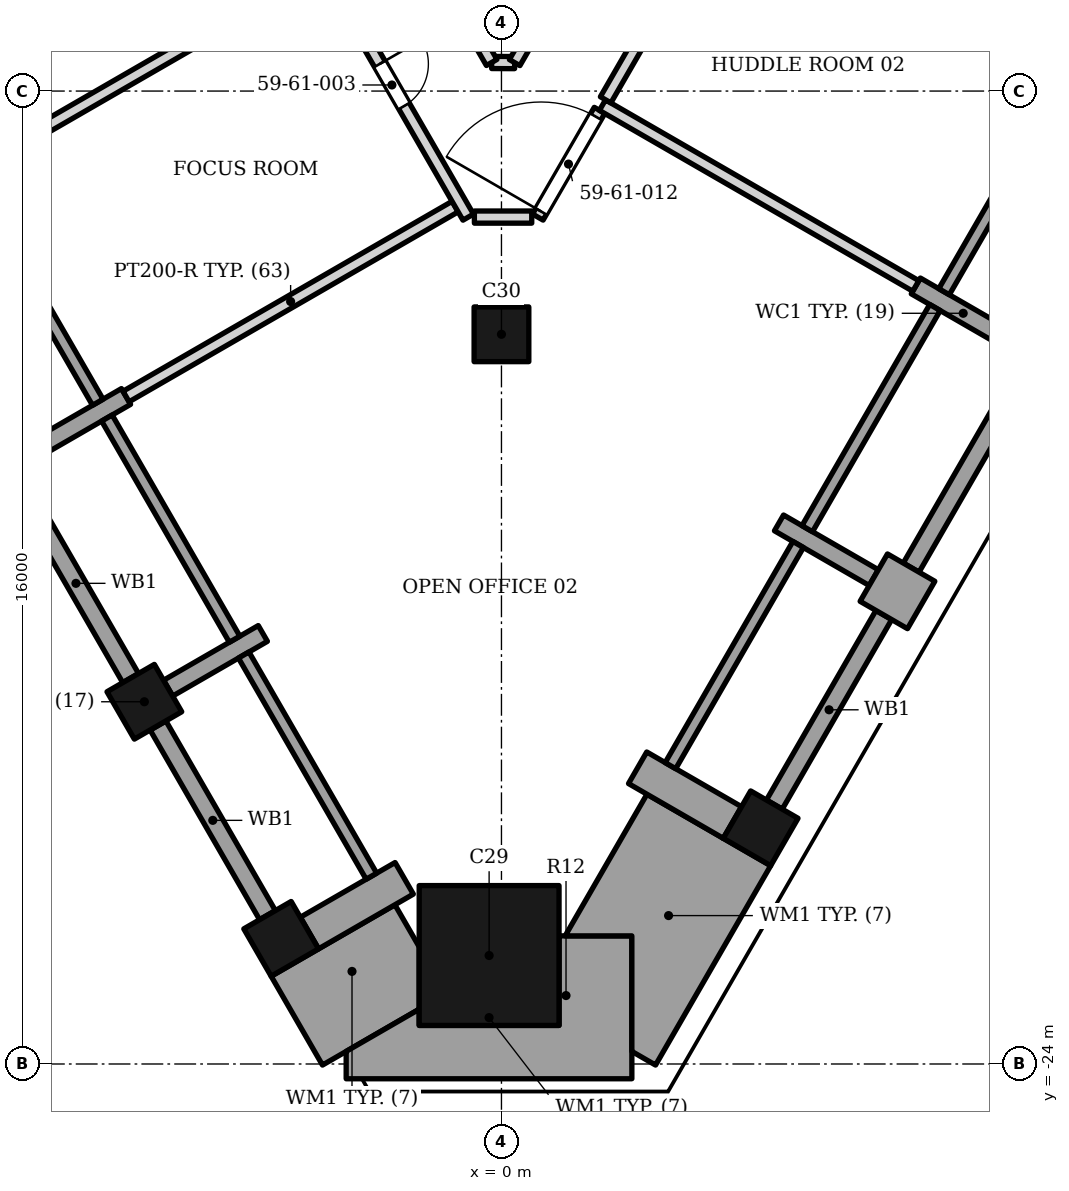
"""IFC4 building model, lengths in metres.
Left out: names, types, materials, properties, quantities, classifications, styles, units other than length and angle.
Written with IfcOpenShell. Run it as: python <this file> out.ifc"""

import sys

from ifc_helpers import new_model, si_unit, direction, frame, frame_2d, origin, origin_2d, place, context, subcontext, project, spatial, polyline, rectangle, outline, extrude, element, fill, save


model = new_model("IFC4")
c1 = context("Model", 3, precision=1e-05, world=origin(), true_north=direction((0.0, 1.0)))
c2 = subcontext(c1, "Body", "Model", "MODEL_VIEW")
j1 = project(units=[si_unit("LENGTHUNIT", "METRE"), si_unit("PLANEANGLEUNIT", "RADIAN")], contexts=[c1])
p1 = place(None, origin())
s1 = spatial("IfcSite", under=j1, at=p1, CompositionType="ELEMENT")
p2 = place(p1, origin())
s2 = spatial("IfcBuilding", under=s1, at=p2, CompositionType="ELEMENT")
p3 = place(p2, frame((0.0, 0.0, 248.2)))
s3 = spatial("IfcBuildingStorey", under=s2, at=p3, CompositionType="ELEMENT", Elevation=248.2)
p4 = place(p3, frame((-0.203, -22.216, 0.0), z_axis=(0.0, 0.0, 1.0), x_axis=(0.0, 1.0, 0.0)))
e1 = element("IfcColumn", 1, at=p4, inside=s3, PredefinedType="COLUMN", context=c2, shape_type="SweptSolid", body=[
    extrude(rectangle(XDim=2.3, YDim=2.3, at=origin_2d()), origin(), (0.0, 0.0, 1.0), 3.9),
])
for number, where, z_axis, x_axis in (
    (2, (0.0, -12.0, 0.0), (0.0, 0.0, 1.0), (1.0, 0.0, 0.0)),
    (3, (-5.873, -18.043, 0.0), (0.0, 0.0, 1.0), (0.5, -0.866, 0.0)),
    (4, (-3.623, -21.942, 0.0), (0.0, 0.0, 1.0), (0.5, -0.866, 0.0)),
    (5, (4.263, -20.124, 0.0), (0.0, 0.0, 1.0), (0.5, 0.866, 0.0)),
):
    element("IfcColumn", number, at=place(p3, frame(where, z_axis=z_axis, x_axis=x_axis)), inside=s3, PredefinedType="COLUMN", context=c2, shape_type="SweptSolid", body=[
        extrude(rectangle(XDim=0.9, YDim=0.9, at=origin_2d()), origin(), (0.0, 0.0, 1.0), 3.9),
    ])
p5 = place(p3, frame((-6.174, -13.022, 0.0), z_axis=(0.0, 0.0, 1.0), x_axis=(-0.865989075817, -0.500062916607, 0.0)))
e6 = element("IfcWall", 6, at=p5, inside=s3, PredefinedType="SOLIDWALL", context=c2, shape_type="SweptSolid", body=[
    extrude(rectangle(XDim=1.8, YDim=0.3, at=frame_2d((0.9, 0.0))), origin(), (0.0, 0.0, 1.0), 3.0),
])
p6 = place(p3, frame((-3.924, -16.92, 0.0), z_axis=(0.0, 0.0, 1.0), x_axis=(-0.866004803686, -0.500035678719, 0.0)))
e7 = element("IfcWall", 7, at=p6, inside=s3, PredefinedType="SOLIDWALL", context=c2, shape_type="SweptSolid", body=[
    extrude(rectangle(XDim=1.799, YDim=0.3, at=frame_2d((0.899, 0.0))), origin(), (0.0, 0.0, 1.0), 3.0),
])
p7 = place(p3, frame((-3.158, -21.847, 0.0), z_axis=(0.0, 0.0, 1.0), x_axis=(0.866047807691, 0.499961193289, 0.0)))
e8 = element("IfcWall", 8, at=p7, inside=s3, PredefinedType="SOLIDWALL", context=c2, shape_type="SweptSolid", body=[
    extrude(rectangle(XDim=1.8, YDim=0.6, at=frame_2d((0.9, 0.0))), origin(), (0.0, 0.0, 1.0), 3.0),
])
p8 = place(p3, frame((-8.739, -9.48, 0.0), z_axis=(0.0, 0.0, 1.0), x_axis=(0.500027713859, -0.866009402589, 0.0)))
e9 = element("IfcWall", 9, at=p8, inside=s3, PredefinedType="ELEMENTEDWALL", context=c2, shape_type="SweptSolid", body=[
    extrude(rectangle(XDim=4.2, YDim=0.2, at=frame_2d((2.1, 0.0))), origin(), (0.0, 0.0, 1.0), 2.95),
])
p9 = place(p3, frame((-6.099, -17.654, 0.0), z_axis=(0.0, 0.0, 1.0), x_axis=(-0.500035678719, 0.866004803686, 0.0)))
e10 = element("IfcWall", 10, at=p9, inside=s3, PredefinedType="SOLIDWALL", context=c2, shape_type="SweptSolid", body=[
    extrude(rectangle(XDim=3.598, YDim=0.3, at=frame_2d((1.799, 0.0))), origin(), (0.0, 0.0, 1.0), 3.0),
])
p10 = place(p3, frame((-6.489, -13.377, 0.0), z_axis=(0.0, 0.0, 1.0), x_axis=(0.500002543286, -0.866023935413, 0.0)))
e11 = element("IfcWall", 11, at=p10, inside=s3, PredefinedType="ELEMENTEDWALL", context=c2, shape_type="SweptSolid", body=[
    extrude(rectangle(XDim=4.2, YDim=0.2, at=frame_2d((2.1, 0.0))), origin(), (0.0, 0.0, 1.0), 3.0),
])
p11 = place(p3, frame((-5.648, -18.434, 0.0), z_axis=(0.0, 0.0, 1.0), x_axis=(0.500012057535, -0.866018442252, 0.0)))
e12 = element("IfcWall", 12, at=p11, inside=s3, PredefinedType="SOLIDWALL", context=c2, shape_type="SweptSolid", body=[
    extrude(rectangle(XDim=3.6, YDim=0.3, at=frame_2d((1.8, 0.0))), origin(), (0.0, 0.0, 1.0), 3.0),
])
p12 = place(p3, frame((-4.239, -17.275, 0.0), z_axis=(0.0, 0.0, 1.0), x_axis=(0.500027713859, -0.866009402589, 0.0)))
e13 = element("IfcWall", 13, at=p12, inside=s3, PredefinedType="ELEMENTEDWALL", context=c2, shape_type="SweptSolid", body=[
    extrude(rectangle(XDim=4.2, YDim=0.2, at=frame_2d((2.1, 0.0))), origin(), (0.0, 0.0, 1.0), 3.0),
])
p13 = place(p3, frame((3.798, -20.029, 0.0), z_axis=(0.0, 0.0, 1.0), x_axis=(-0.866047807691, 0.499961193289, 0.0)))
e14 = element("IfcWall", 14, at=p13, inside=s3, PredefinedType="SOLIDWALL", context=c2, shape_type="SweptSolid", body=[
    extrude(rectangle(XDim=1.8, YDim=0.6, at=frame_2d((0.9, 0.0))), origin(), (0.0, 0.0, 1.0), 3.0),
])
p14 = place(p3, frame((6.288, -16.616, 0.0), z_axis=(0.0, 0.0, 1.0), x_axis=(0.499902469156, 0.866081705922, 0.0)))
e15 = element("IfcWall", 15, at=p14, inside=s3, PredefinedType="SOLIDWALL", context=c2, shape_type="SweptSolid", body=[
    extrude(rectangle(XDim=0.9, YDim=0.9, at=frame_2d((0.45, 0.0))), origin(), (0.0, 0.0, 1.0), 3.0),
])
p15 = place(p3, frame((6.123, -16.002, 0.0), z_axis=(0.0, 0.0, 1.0), x_axis=(-0.865989075817, 0.500062916607, 0.0)))
e16 = element("IfcWall", 16, at=p15, inside=s3, PredefinedType="SOLIDWALL", context=c2, shape_type="SweptSolid", body=[
    extrude(rectangle(XDim=1.8, YDim=0.3, at=frame_2d((0.9, 0.0))), origin(), (0.0, 0.0, 1.0), 3.0),
])
p16 = place(p3, frame((8.373, -12.104, 0.0), z_axis=(0.0, 0.0, 1.0), x_axis=(-0.866047807691, 0.499961193289, 0.0)))
e17 = element("IfcWall", 17, at=p16, inside=s3, PredefinedType="SOLIDWALL", context=c2, shape_type="SweptSolid", body=[
    extrude(rectangle(XDim=1.8, YDim=0.3, at=frame_2d((0.9, 0.0))), origin(), (0.0, 0.0, 1.0), 2.95),
])
p17 = place(p3, frame((4.488, -19.734, 0.0), z_axis=(0.0, 0.0, 1.0), x_axis=(0.500012057535, 0.866018442252, 0.0)))
e18 = element("IfcWall", 18, at=p17, inside=s3, PredefinedType="SOLIDWALL", context=c2, shape_type="SweptSolid", body=[
    extrude(rectangle(XDim=3.6, YDim=0.3, at=frame_2d((1.8, 0.0))), origin(), (0.0, 0.0, 1.0), 3.0),
])
p18 = place(p3, frame((2.779, -19.094, 0.0), z_axis=(0.0, 0.0, 1.0), x_axis=(0.500027713859, 0.866009402589, 0.0)))
e19 = element("IfcWall", 19, at=p18, inside=s3, PredefinedType="ELEMENTEDWALL", context=c2, shape_type="SweptSolid", body=[
    extrude(rectangle(XDim=4.2, YDim=0.2, at=frame_2d((2.1, 0.0))), origin(), (0.0, 0.0, 1.0), 3.0),
])
p19 = place(p3, frame((6.738, -15.837, 0.0), z_axis=(0.0, 0.0, 1.0), x_axis=(0.499990559667, 0.866030854095, 0.0)))
e20 = element("IfcWall", 20, at=p19, inside=s3, PredefinedType="SOLIDWALL", context=c2, shape_type="SweptSolid", body=[
    extrude(rectangle(XDim=3.6, YDim=0.3, at=frame_2d((1.8, 0.0))), origin(), (0.0, 0.0, 1.0), 3.0),
])
p20 = place(p3, frame((5.029, -15.197, 0.0), z_axis=(0.0, 0.0, 1.0), x_axis=(0.500002543286, 0.866023935413, 0.0)))
e21 = element("IfcWall", 21, at=p20, inside=s3, PredefinedType="ELEMENTEDWALL", context=c2, shape_type="SweptSolid", body=[
    extrude(rectangle(XDim=4.2, YDim=0.2, at=frame_2d((2.1, 0.0))), origin(), (0.0, 0.0, 1.0), 2.95),
])
p21 = place(p3, frame((7.279, -11.3, 0.0), z_axis=(0.0, 0.0, 1.0), x_axis=(0.500027713859, 0.866009402589, 0.0)))
e22 = element("IfcWall", 22, at=p21, inside=s3, PredefinedType="ELEMENTEDWALL", context=c2, shape_type="SweptSolid", body=[
    extrude(rectangle(XDim=4.2, YDim=0.2, at=frame_2d((2.1, 0.0))), origin(), (0.0, 0.0, 1.0), 3.0),
])
p22 = place(p3, origin())
e23 = element("IfcWall", 23, at=p22, inside=s3, PredefinedType="SOLIDWALL", context=c2, shape_type="SweptSolid", body=[
    extrude(outline(polyline([(-1.353, -22.073), (-1.752, -21.382), (-3.008, -22.107), (-3.008, -22.107), (-3.788, -22.557), (-2.944, -24.018), (-1.353, -23.1), (-1.353, -22.073)])), origin(), (0.0, 0.0, 1.0), 3.0),
])
p23 = place(p3, origin())
e24 = element("IfcWall", 24, at=p23, inside=s3, PredefinedType="SOLIDWALL", context=c2, shape_type="SweptSolid", body=[
    extrude(outline(polyline([(-1.353, -23.366), (-1.353, -23.1), (-2.554, -23.793), (-2.554, -24.243), (2.145, -24.243), (2.145, -21.893), (0.947, -21.893), (0.947, -23.366), (-1.353, -23.366)])), origin(), (0.0, 0.0, 1.0), 3.0),
])
p24 = place(p3, origin())
e25 = element("IfcWall", 25, at=p24, inside=s3, PredefinedType="SOLIDWALL", context=c2, shape_type="SweptSolid", body=[
    extrude(outline(polyline([(3.648, -20.289), (2.393, -19.563), (1.048, -21.893), (2.145, -21.893), (2.145, -23.793), (2.534, -24.018), (4.427, -20.739), (3.648, -20.289), (3.648, -20.289)])), origin(), (0.0, 0.0, 1.0), 3.0),
])
p25 = place(p3, frame((-6.174, -13.023, 0.0), z_axis=(0.0, 0.0, 1.0), x_axis=(0.866143960209, 0.499794598003, 0.0)))
e26 = element("IfcWall", 26, at=p25, inside=s3, PredefinedType="PARTITIONING", context=c2, shape_type="SweptSolid", body=[
    extrude(rectangle(XDim=6.25, YDim=0.2, at=frame_2d((3.125, 0.0))), origin(), (0.0, 0.0, 1.0), 2.884),
])
p26 = place(p3, frame((-5.177, -2.054, 0.0), z_axis=(0.0, 0.0, 1.0), x_axis=(0.499987206771, -0.866032789833, 0.0)))
e27 = element("IfcWall", 27, at=p26, inside=s3, PredefinedType="PARTITIONING", context=c2, shape_type="SweptSolid", body=[
    extrude(rectangle(XDim=9.26, YDim=0.2, at=frame_2d((4.63, 0.0))), origin(), (0.0, 0.0, 1.0), 2.884),
])
p27 = place(p26, frame((1.75, 0.0, 0.0)))
e28 = element("IfcOpeningElement", 28, at=p27, cuts=e27, PredefinedType="OPENING", context=c2, shape_type="SweptSolid", body=[
    extrude(rectangle(XDim=1.0, YDim=2.1, at=frame_2d((0.5, 1.05))), frame((0.0, 0.11, 0.0), z_axis=(0.0, -1.0, 0.0), x_axis=(1.0, 0.0, 0.0)), (0.0, 0.0, 1.0), 0.22),
])
p28 = place(p26, frame((6.35, 0.0, 0.0)))
e29 = element("IfcOpeningElement", 29, at=p28, cuts=e27, PredefinedType="OPENING", context=c2, shape_type="SweptSolid", body=[
    extrude(rectangle(XDim=0.8, YDim=2.1, at=frame_2d((0.4, 1.05))), frame((0.0, 0.11, 0.0), z_axis=(0.0, -1.0, 0.0), x_axis=(1.0, 0.0, 0.0)), (0.0, 0.0, 1.0), 0.22),
])
p29 = place(p3, frame((-0.445, -10.073, 0.0), z_axis=(0.0, 0.0, 1.0), x_axis=(1.0, 0.0, 0.0)))
e30 = element("IfcWall", 30, at=p29, inside=s3, PredefinedType="PARTITIONING", context=c2, shape_type="SweptSolid", body=[
    extrude(rectangle(XDim=0.943, YDim=0.2, at=frame_2d((0.472, 0.0))), origin(), (0.0, 0.0, 1.0), 3.73),
])
p30 = place(p3, frame((0.598, -10.073, 0.0), z_axis=(0.0, 0.0, 1.0), x_axis=(0.500670744682, 0.865637802675, 0.0)))
e31 = element("IfcWall", 31, at=p30, inside=s3, PredefinedType="PARTITIONING", context=c2, shape_type="SweptSolid", body=[
    extrude(rectangle(XDim=2.028, YDim=0.2, at=frame_2d((1.014, 0.0))), origin(), (0.0, 0.0, 1.0), 3.73),
])
p31 = place(p30, frame((0.107, 0.0, 0.0)))
e32 = element("IfcOpeningElement", 32, at=p31, cuts=e31, PredefinedType="OPENING", context=c2, shape_type="SweptSolid", body=[
    extrude(rectangle(XDim=1.8, YDim=2.4, at=frame_2d((0.9, 1.2))), frame((0.0, 0.11, 0.0), z_axis=(0.0, -1.0, 0.0), x_axis=(1.0, 0.0, 0.0)), (0.0, 0.0, 1.0), 0.22),
])
p32 = place(p3, frame((1.661, -8.231, 0.0), z_axis=(0.0, 0.0, 1.0), x_axis=(0.866162357873, -0.499762713499, 0.0)))
e33 = element("IfcWall", 33, at=p32, inside=s3, PredefinedType="PARTITIONING", context=c2, shape_type="SweptSolid", body=[
    extrude(rectangle(XDim=5.95, YDim=0.2, at=frame_2d((2.975, 0.0))), origin(), (0.0, 0.0, 1.0), 2.884),
])
p33 = place(p3, frame((-0.161, -7.53, 0.0), z_axis=(0.0, 0.0, 1.0), x_axis=(0.999986611797, -0.005174574964, 0.0)))
e34 = element("IfcWall", 34, at=p33, inside=s3, PredefinedType="PARTITIONING", context=c2, shape_type="SweptSolid", body=[
    extrude(rectangle(XDim=0.377, YDim=0.2, at=frame_2d((0.189, 0.0))), origin(), (0.0, 0.0, 1.0), 3.73),
])
p34 = place(p3, frame((0.217, -7.532, 0.0), z_axis=(0.0, 0.0, 1.0), x_axis=(0.499766665369, 0.866160077691, 0.0)))
e35 = element("IfcWall", 35, at=p34, inside=s3, PredefinedType="PARTITIONING", context=c2, shape_type="SweptSolid", body=[
    extrude(rectangle(XDim=12.588, YDim=0.2, at=frame_2d((6.294, 0.0))), origin(), (0.0, 0.0, 1.0), 2.884),
])
p35 = place(p34, frame((9.201, 0.0, 0.0)))
e36 = element("IfcOpeningElement", 36, at=p35, cuts=e35, PredefinedType="OPENING", context=c2, shape_type="SweptSolid", body=[
    extrude(rectangle(XDim=0.8, YDim=2.1, at=frame_2d((0.4, 1.05))), frame((0.0, 0.11, 0.0), z_axis=(0.0, -1.0, 0.0), x_axis=(1.0, 0.0, 0.0)), (0.0, 0.0, 1.0), 0.22),
])
p36 = place(p3, frame((-8.424, -9.125, 0.0), z_axis=(0.0, 0.0, 1.0), x_axis=(0.866180383398, 0.499731471309, 0.0)))
e37 = element("IfcWall", 37, at=p36, inside=s3, PredefinedType="PARTITIONING", context=c2, shape_type="SweptSolid", body=[
    extrude(rectangle(XDim=6.25, YDim=0.2, at=frame_2d((3.125, 0.0))), origin(), (0.0, 0.0, 1.0), 2.884),
])
p37 = place(p3, frame((1.713, -8.144, 0.0), z_axis=(0.0, 0.0, 1.0), x_axis=(0.499986217557, 0.866033360935, 0.0)))
e38 = element("IfcWall", 38, at=p37, inside=s3, PredefinedType="PARTITIONING", context=c2, shape_type="SweptSolid", body=[
    extrude(rectangle(XDim=4.3, YDim=0.2, at=frame_2d((2.15, 0.0))), origin(), (0.0, 0.0, 1.0), 3.73),
])
p38 = place(p37, frame((1.65, 0.0, 0.0)))
e39 = element("IfcOpeningElement", 39, at=p38, cuts=e38, PredefinedType="OPENING", context=c2, shape_type="SweptSolid", body=[
    extrude(rectangle(XDim=1.0, YDim=2.1, at=frame_2d((0.5, 1.05))), frame((0.0, 0.11, 0.0), z_axis=(0.0, -1.0, 0.0), x_axis=(1.0, 0.0, 0.0)), (0.0, 0.0, 1.0), 0.22),
])
p39 = place(p3, frame((3.914, -4.332, 0.0), z_axis=(0.0, 0.0, 1.0), x_axis=(0.865897075154, -0.500222205864, 0.0)))
e40 = element("IfcWall", 40, at=p39, inside=s3, PredefinedType="PARTITIONING", context=c2, shape_type="SweptSolid", body=[
    extrude(rectangle(XDim=5.948, YDim=0.2, at=frame_2d((2.974, 0.0))), origin(), (0.0, 0.0, 1.0), 2.884),
])
p40 = place(p3, frame((-6.458, 3.37, 0.0), z_axis=(0.0, 0.0, 1.0), x_axis=(0.500262411632, -0.86587384734, 0.0)))
e41 = element("IfcWall", 41, at=p40, inside=s3, PredefinedType="PARTITIONING", context=c2, shape_type="SweptSolid", body=[
    extrude(rectangle(XDim=12.589, YDim=0.2, at=frame_2d((6.294, 0.0))), origin(), (0.0, 0.0, 1.0), 2.884),
])
p41 = place(p40, frame((8.832, 0.0, 0.0)))
e42 = element("IfcOpeningElement", 42, at=p41, cuts=e41, PredefinedType="OPENING", context=c2, shape_type="SweptSolid", body=[
    extrude(rectangle(XDim=0.9, YDim=2.1, at=frame_2d((0.45, 1.05))), frame((0.0, 0.11, 0.0), z_axis=(0.0, -1.0, 0.0), x_axis=(1.0, 0.0, 0.0)), (0.0, 0.0, 1.0), 0.22),
])
p42 = place(p40, frame((2.488, 0.0, 0.0)))
e43 = element("IfcOpeningElement", 43, at=p42, cuts=e41, PredefinedType="OPENING", context=c2, shape_type="SweptSolid", body=[
    extrude(rectangle(XDim=1.0, YDim=2.1, at=frame_2d((0.5, 1.05))), frame((0.0, 0.11, 0.0), z_axis=(0.0, -1.0, 0.0), x_axis=(1.0, 0.0, 0.0)), (0.0, 0.0, 1.0), 0.22),
])
p43 = place(p28, origin())
e44 = element("IfcDoor", 44, at=p43, inside=s3, OperationType="SINGLE_SWING_LEFT", PredefinedType="DOOR", context=c2, shape_type="SweptSolid", body=[
    extrude(rectangle(XDim=0.8, YDim=2.1, at=frame_2d((0.4, 1.05))), frame((0.0, 0.025, 0.0), z_axis=(0.0, -1.0, 0.0), x_axis=(1.0, 0.0, 0.0)), (0.0, 0.0, 1.0), 0.05),
])
fill(e29, e44)
p44 = place(p31, origin())
e45 = element("IfcDoor", 45, at=p44, inside=s3, OperationType="DOUBLE_DOOR_SINGLE_SWING", PredefinedType="DOOR", context=c2, shape_type="SweptSolid", body=[
    extrude(rectangle(XDim=1.8, YDim=2.4, at=frame_2d((0.9, 1.2))), frame((0.0, 0.025, 0.0), z_axis=(0.0, -1.0, 0.0), x_axis=(1.0, 0.0, 0.0)), (0.0, 0.0, 1.0), 0.05),
])
fill(e32, e45)
save(model, sys.argv[1])
